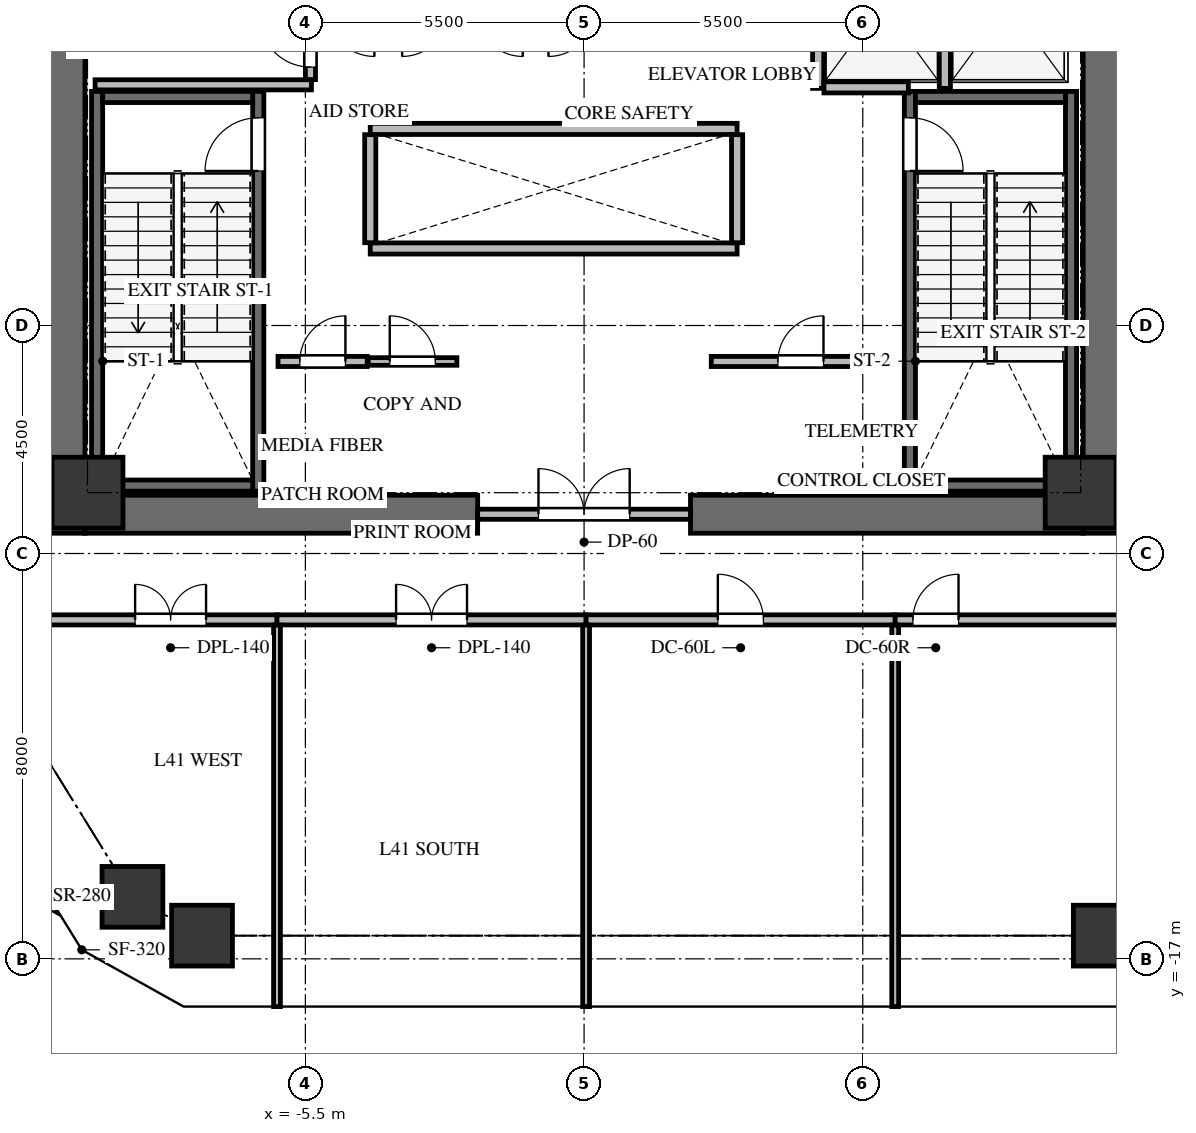
"""IFC4 building model, lengths in metres.
Left out: names, types, materials, properties, quantities, classifications, styles, units other than length and angle.
Written with IfcOpenShell. Run it as: python <this file> out.ifc"""

import sys

from ifc_helpers import new_model, si_unit, direction, frame, frame_2d, origin, origin_2d, place, context, subcontext, project, spatial, rectangle, extrude, source, transform, mapped, element, fill, save


model = new_model("IFC4")
c1 = context("Model", 3, precision=1e-05, world=origin(), true_north=direction((0.0, 1.0)))
c2 = subcontext(c1, "Body", "Model", "MODEL_VIEW")
j1 = project(units=[si_unit("LENGTHUNIT", "METRE"), si_unit("PLANEANGLEUNIT", "RADIAN")], contexts=[c1])
p1 = place(None, origin())
s1 = spatial("IfcSite", under=j1, at=p1, CompositionType="ELEMENT")
p2 = place(p1, origin())
s2 = spatial("IfcBuilding", under=s1, at=p2, CompositionType="ELEMENT")
p3 = place(p2, frame((0.0, 0.0, 150.3)))
s3 = spatial("IfcBuildingStorey", under=s2, at=p3, CompositionType="ELEMENT", Elevation=150.3)
for number, where, z_axis, x_axis in (
    (1, (-10.225, -8.6, 0.0), (0.0, 0.0, 1.0), (0.0, 1.0, 0.0)),
    (2, (10.225, -8.6, 0.0), (0.0, 0.0, 1.0), (0.0, 1.0, 0.0)),
):
    element("IfcWall", number, at=place(p3, frame(where, z_axis=z_axis, x_axis=x_axis)), inside=s3, PredefinedType="SHEAR", context=c2, shape_type="SweptSolid", body=[
        extrude(rectangle(XDim=17.2, YDim=0.75, at=frame_2d((8.6, 0.0))), origin(), (0.0, 0.0, 1.0), 4.8),
    ])
for number, where, z_axis, x_axis in (
    (3, (-9.85, -8.225, 0.0), (0.0, 0.0, 1.0), (1.0, 0.0, 0.0)),
    (4, (2.1, -8.225, 0.0), (0.0, 0.0, 1.0), (1.0, 0.0, 0.0)),
):
    element("IfcWall", number, at=place(p3, frame(where, z_axis=z_axis, x_axis=x_axis)), inside=s3, PredefinedType="SHEAR", context=c2, shape_type="SweptSolid", body=[
        extrude(rectangle(XDim=7.75, YDim=0.75, at=frame_2d((3.875, 0.0))), origin(), (0.0, 0.0, 1.0), 4.8),
    ])
p4 = place(p3, frame((-6.43, -7.77, -0.32), z_axis=(0.0, 0.0, 1.0), x_axis=(0.0, 1.0, 0.0)))
e5 = element("IfcWall", 5, at=p4, inside=s3, PredefinedType="SHEAR", context=c2, shape_type="SweptSolid", body=[
    extrude(rectangle(XDim=7.89, YDim=0.22, at=frame_2d((3.945, 0.0))), origin(), (0.0, 0.0, 1.0), 4.8),
])
p5 = place(p4, frame((6.32, 0.0, 0.0)))
e6 = element("IfcOpeningElement", 6, at=p5, cuts=e5, PredefinedType="OPENING", context=c2, shape_type="SweptSolid", body=[
    extrude(rectangle(XDim=1.05, YDim=2.15, at=frame_2d((0.525, 1.075))), frame((0.0, 0.12, 0.0), z_axis=(0.0, -1.0, 0.0), x_axis=(1.0, 0.0, 0.0)), (0.0, 0.0, 1.0), 0.24),
])
p6 = place(p3, frame((-9.61, 0.12, -0.32), z_axis=(0.0, 0.0, 1.0), x_axis=(0.0, -1.0, 0.0)))
e7 = element("IfcWall", 7, at=p6, inside=s3, PredefinedType="SHEAR", context=c2, shape_type="SweptSolid", body=[
    extrude(rectangle(XDim=7.89, YDim=0.22, at=frame_2d((3.945, 0.0))), origin(), (0.0, 0.0, 1.0), 4.8),
])
for number, where, z_axis, x_axis in (
    (8, (-9.5, -7.66, -0.32), (0.0, 0.0, 1.0), (1.0, 0.0, 0.0)),
    (9, (-6.54, 0.01, -0.32), (0.0, 0.0, 1.0), (-1.0, 0.0, 0.0)),
):
    element("IfcWall", number, at=place(p3, frame(where, z_axis=z_axis, x_axis=x_axis)), inside=s3, PredefinedType="SHEAR", context=c2, shape_type="SweptSolid", body=[
        extrude(rectangle(XDim=2.96, YDim=0.22, at=frame_2d((1.48, 0.0))), origin(), (0.0, 0.0, 1.0), 4.8),
    ])
p7 = place(p3, frame((9.61, -7.77, -0.32), z_axis=(0.0, 0.0, 1.0), x_axis=(0.0, 1.0, 0.0)))
e10 = element("IfcWall", 10, at=p7, inside=s3, PredefinedType="SHEAR", context=c2, shape_type="SweptSolid", body=[
    extrude(rectangle(XDim=7.89, YDim=0.22, at=frame_2d((3.945, 0.0))), origin(), (0.0, 0.0, 1.0), 4.8),
])
p8 = place(p3, frame((6.43, 0.12, -0.32), z_axis=(0.0, 0.0, 1.0), x_axis=(0.0, -1.0, 0.0)))
e11 = element("IfcWall", 11, at=p8, inside=s3, PredefinedType="SHEAR", context=c2, shape_type="SweptSolid", body=[
    extrude(rectangle(XDim=7.89, YDim=0.22, at=frame_2d((3.945, 0.0))), origin(), (0.0, 0.0, 1.0), 4.8),
])
p9 = place(p8, frame((0.52, 0.0, 0.0)))
e12 = element("IfcOpeningElement", 12, at=p9, cuts=e11, PredefinedType="OPENING", context=c2, shape_type="SweptSolid", body=[
    extrude(rectangle(XDim=1.05, YDim=2.15, at=frame_2d((0.525, 1.075))), frame((0.0, 0.12, 0.0), z_axis=(0.0, -1.0, 0.0), x_axis=(1.0, 0.0, 0.0)), (0.0, 0.0, 1.0), 0.24),
])
for number, where, z_axis, x_axis in (
    (13, (6.54, -7.66, -0.32), (0.0, 0.0, 1.0), (1.0, 0.0, 0.0)),
    (14, (9.5, 0.01, -0.32), (0.0, 0.0, 1.0), (-1.0, 0.0, 0.0)),
):
    element("IfcWall", number, at=place(p3, frame(where, z_axis=z_axis, x_axis=x_axis)), inside=s3, PredefinedType="SHEAR", context=c2, shape_type="SweptSolid", body=[
        extrude(rectangle(XDim=2.96, YDim=0.22, at=frame_2d((1.48, 0.0))), origin(), (0.0, 0.0, 1.0), 4.8),
    ])
m1 = source(origin(), c2, "Body", "SweptSolid", [
    extrude(rectangle(XDim=1.4, YDim=1.4, at=origin_2d()), origin(), (0.0, 0.0, 1.0), 4.8),
])
for number, where, z_axis, x_axis in (
    (15, (-9.8, -7.8, -0.32), (0.0, 0.0, 1.0), (1.0, 0.0, 0.0)),
    (16, (9.8, -7.8, -0.32), (0.0, 0.0, 1.0), (1.0, 0.0, 0.0)),
):
    element("IfcColumn", number, at=place(p3, frame(where, z_axis=z_axis, x_axis=x_axis)), inside=s3, PredefinedType="COLUMN", context=c2, shape_type="MappedRepresentation", body=[
        mapped(m1, transform((0.0, 0.0, 0.0), x_axis=(1.0, 0.0, 0.0), y_axis=(0.0, 1.0, 0.0), z_axis=(0.0, 0.0, 1.0), scale=1.0)),
    ])
m2 = source(origin(), c2, "Body", "SweptSolid", [
    extrude(rectangle(XDim=1.2, YDim=1.2, at=origin_2d()), origin(), (0.0, 0.0, 1.0), 4.8),
])
for number, where, z_axis, x_axis in (
    (17, (-8.913, -15.776, -0.32), (0.0, 0.0, 1.0), (1.0, 0.0, 0.0)),
    (18, (10.257, -16.542, -0.32), (0.0, 0.0, 1.0), (1.0, 0.0, 0.0)),
    (19, (-7.54, -16.542, -0.32), (0.0, 0.0, 1.0), (1.0, 0.0, 0.0)),
):
    element("IfcColumn", number, at=place(p3, frame(where, z_axis=z_axis, x_axis=x_axis)), inside=s3, PredefinedType="COLUMN", context=c2, shape_type="MappedRepresentation", body=[
        mapped(m2, transform((0.0, 0.0, 0.0), x_axis=(1.0, 0.0, 0.0), y_axis=(0.0, 1.0, 0.0), z_axis=(0.0, 0.0, 1.0), scale=1.0)),
    ])
p10 = place(p3, frame((-2.1, -8.225, 0.0), z_axis=(0.0, 0.0, 1.0), x_axis=(1.0, 0.0, 0.0)))
e20 = element("IfcWall", 20, at=p10, inside=s3, PredefinedType="SOLIDWALL", context=c2, shape_type="SweptSolid", body=[
    extrude(rectangle(XDim=4.2, YDim=0.2, at=frame_2d((2.1, 0.0))), origin(), (0.0, 0.0, 1.0), 4.465),
])
p11 = place(p10, frame((1.2, 0.0, 0.0)))
e21 = element("IfcOpeningElement", 21, at=p11, cuts=e20, PredefinedType="OPENING", context=c2, shape_type="SweptSolid", body=[
    extrude(rectangle(XDim=1.8, YDim=2.15, at=frame_2d((0.9, 1.075))), frame((0.0, 0.11, 0.0), z_axis=(0.0, -1.0, 0.0), x_axis=(1.0, 0.0, 0.0)), (0.0, 0.0, 1.0), 0.22),
])
p12 = place(p3, frame((-9.65, 0.25, 0.0), z_axis=(0.0, 0.0, 1.0), x_axis=(1.0, 0.0, 0.0)))
e22 = element("IfcWall", 22, at=p12, inside=s3, PredefinedType="SOLIDWALL", context=c2, shape_type="SweptSolid", body=[
    extrude(rectangle(XDim=4.27, YDim=0.2, at=frame_2d((2.135, 0.0))), origin(), (0.0, 0.0, 1.0), 4.465),
])
p13 = place(p3, frame((-5.4, 0.354, 0.0), z_axis=(0.0, 0.0, 1.0), x_axis=(0.0, 1.0, 0.0)))
e23 = element("IfcWall", 23, at=p13, inside=s3, PredefinedType="SOLIDWALL", context=c2, shape_type="SweptSolid", body=[
    extrude(rectangle(XDim=4.026, YDim=0.2, at=frame_2d((2.013, 0.0))), origin(), (0.0, 0.0, 1.0), 4.465),
])
p14 = place(p13, frame((0.246, 0.0, 0.0)))
e24 = element("IfcOpeningElement", 24, at=p14, cuts=e23, PredefinedType="OPENING", context=c2, shape_type="SweptSolid", body=[
    extrude(rectangle(XDim=1.0, YDim=2.15, at=frame_2d((0.5, 1.075))), frame((0.0, 0.11, 0.0), z_axis=(0.0, -1.0, 0.0), x_axis=(1.0, 0.0, 0.0)), (0.0, 0.0, 1.0), 0.22),
])
for number, where, z_axis, x_axis in (
    (25, (4.62, 0.18, 0.0), (0.0, 0.0, 1.0), (0.0, 1.0, 0.0)),
    (26, (7.12, 0.18, 0.0), (0.0, 0.0, 1.0), (0.0, 1.0, 0.0)),
):
    element("IfcWall", number, at=place(p3, frame(where, z_axis=z_axis, x_axis=x_axis)), inside=s3, PredefinedType="SOLIDWALL", context=c2, shape_type="SweptSolid", body=[
        extrude(rectangle(XDim=3.186, YDim=0.22, at=frame_2d((1.593, 0.0))), origin(), (0.0, 0.0, 1.0), 4.465),
    ])
p15 = place(p3, frame((4.734, 0.2, 0.0), z_axis=(0.0, 0.0, 1.0), x_axis=(1.0, 0.0, 0.0)))
e27 = element("IfcWall", 27, at=p15, inside=s3, PredefinedType="SOLIDWALL", context=c2, shape_type="SweptSolid", body=[
    extrude(rectangle(XDim=1.666, YDim=0.22, at=frame_2d((0.833, 0.0))), origin(), (0.0, 0.0, 1.0), 4.465),
])
for number, where, z_axis, x_axis in (
    (28, (-4.22, -2.98, 0.0), (0.0, 0.0, 1.0), (1.0, 0.0, 0.0)),
    (29, (-4.22, -0.62, 0.0), (0.0, 0.0, 1.0), (1.0, 0.0, 0.0)),
):
    element("IfcWall", number, at=place(p3, frame(where, z_axis=z_axis, x_axis=x_axis)), inside=s3, PredefinedType="SOLIDWALL", context=c2, shape_type="SweptSolid", body=[
        extrude(rectangle(XDim=7.24, YDim=0.22, at=frame_2d((3.62, 0.0))), origin(), (0.0, 0.0, 1.0), 4.465),
    ])
for number, where, z_axis, x_axis in (
    (30, (-4.22, -2.866, 0.0), (0.0, 0.0, 1.0), (0.0, 1.0, 0.0)),
    (31, (3.02, -2.866, 0.0), (0.0, 0.0, 1.0), (0.0, 1.0, 0.0)),
):
    element("IfcWall", number, at=place(p3, frame(where, z_axis=z_axis, x_axis=x_axis)), inside=s3, PredefinedType="SOLIDWALL", context=c2, shape_type="SweptSolid", body=[
        extrude(rectangle(XDim=2.132, YDim=0.22, at=frame_2d((1.066, 0.0))), origin(), (0.0, 0.0, 1.0), 4.465),
    ])
p16 = place(p3, frame((-6.04, -5.21, 0.0), z_axis=(0.0, 0.0, 1.0), x_axis=(1.0, 0.0, 0.0)))
e32 = element("IfcWall", 32, at=p16, inside=s3, PredefinedType="SOLIDWALL", context=c2, shape_type="SweptSolid", body=[
    extrude(rectangle(XDim=1.76, YDim=0.2, at=frame_2d((0.88, 0.0))), origin(), (0.0, 0.0, 1.0), 4.465),
])
p17 = place(p16, frame((0.43, 0.0, 0.0)))
e33 = element("IfcOpeningElement", 33, at=p17, cuts=e32, PredefinedType="OPENING", context=c2, shape_type="SweptSolid", body=[
    extrude(rectangle(XDim=0.9, YDim=2.05, at=frame_2d((0.45, 1.025))), frame((0.0, 0.11, 0.0), z_axis=(0.0, -1.0, 0.0), x_axis=(1.0, 0.0, 0.0)), (0.0, 0.0, 1.0), 0.22),
])
p18 = place(p3, frame((-4.26, -5.21, 0.0), z_axis=(0.0, 0.0, 1.0), x_axis=(1.0, 0.0, 0.0)))
e34 = element("IfcWall", 34, at=p18, inside=s3, PredefinedType="PARTITIONING", context=c2, shape_type="SweptSolid", body=[
    extrude(rectangle(XDim=1.75, YDim=0.15, at=frame_2d((0.875, 0.0))), origin(), (0.0, 0.0, 1.0), 4.465),
])
p19 = place(p18, frame((0.425, 0.0, 0.0)))
e35 = element("IfcOpeningElement", 35, at=p19, cuts=e34, PredefinedType="OPENING", context=c2, shape_type="SweptSolid", body=[
    extrude(rectangle(XDim=0.9, YDim=2.05, at=frame_2d((0.45, 1.025))), frame((0.0, 0.085, 0.0), z_axis=(0.0, -1.0, 0.0), x_axis=(1.0, 0.0, 0.0)), (0.0, 0.0, 1.0), 0.17),
])
p20 = place(p3, frame((2.51, -5.21, 0.0), z_axis=(0.0, 0.0, 1.0), x_axis=(1.0, 0.0, 0.0)))
e36 = element("IfcWall", 36, at=p20, inside=s3, PredefinedType="SOLIDWALL", context=c2, shape_type="SweptSolid", body=[
    extrude(rectangle(XDim=3.53, YDim=0.2, at=frame_2d((1.765, 0.0))), origin(), (0.0, 0.0, 1.0), 4.465),
])
p21 = place(p20, frame((1.315, 0.0, 0.0)))
e37 = element("IfcOpeningElement", 37, at=p21, cuts=e36, PredefinedType="OPENING", context=c2, shape_type="SweptSolid", body=[
    extrude(rectangle(XDim=0.9, YDim=2.05, at=frame_2d((0.45, 1.025))), frame((0.0, 0.11, 0.0), z_axis=(0.0, -1.0, 0.0), x_axis=(1.0, 0.0, 0.0)), (0.0, 0.0, 1.0), 0.22),
])
p22 = place(p3, frame((-12.39, -10.31, 0.0), z_axis=(0.0, 0.0, 1.0), x_axis=(1.0, 0.0, 0.0)))
e38 = element("IfcWall", 38, at=p22, inside=s3, PredefinedType="SOLIDWALL", context=c2, shape_type="SweptSolid", body=[
    extrude(rectangle(XDim=6.33, YDim=0.2, at=frame_2d((3.165, 0.0))), origin(), (0.0, 0.0, 1.0), 3.819),
])
p23 = place(p22, frame((3.53, 0.0, 0.0)))
e39 = element("IfcOpeningElement", 39, at=p23, cuts=e38, PredefinedType="OPENING", context=c2, shape_type="SweptSolid", body=[
    extrude(rectangle(XDim=1.4, YDim=2.15, at=frame_2d((0.7, 1.075))), frame((0.0, 0.11, 0.0), z_axis=(0.0, -1.0, 0.0), x_axis=(1.0, 0.0, 0.0)), (0.0, 0.0, 1.0), 0.22),
])
p24 = place(p3, frame((-6.06, -10.31, 0.0), z_axis=(0.0, 0.0, 1.0), x_axis=(1.0, 0.0, 0.0)))
e40 = element("IfcWall", 40, at=p24, inside=s3, PredefinedType="SOLIDWALL", context=c2, shape_type="SweptSolid", body=[
    extrude(rectangle(XDim=6.1, YDim=0.2, at=frame_2d((3.05, 0.0))), origin(), (0.0, 0.0, 1.0), 3.662),
])
p25 = place(p24, frame((2.35, 0.0, 0.0)))
e41 = element("IfcOpeningElement", 41, at=p25, cuts=e40, PredefinedType="OPENING", context=c2, shape_type="SweptSolid", body=[
    extrude(rectangle(XDim=1.4, YDim=2.15, at=frame_2d((0.7, 1.075))), frame((0.0, 0.11, 0.0), z_axis=(0.0, -1.0, 0.0), x_axis=(1.0, 0.0, 0.0)), (0.0, 0.0, 1.0), 0.22),
])
p26 = place(p3, frame((0.04, -10.31, 0.0), z_axis=(0.0, 0.0, 1.0), x_axis=(1.0, 0.0, 0.0)))
e42 = element("IfcWall", 42, at=p26, inside=s3, PredefinedType="SOLIDWALL", context=c2, shape_type="SweptSolid", body=[
    extrude(rectangle(XDim=6.1, YDim=0.2, at=frame_2d((3.05, 0.0))), origin(), (0.0, 0.0, 1.0), 3.662),
])
p27 = place(p26, frame((2.6, 0.0, 0.0)))
e43 = element("IfcOpeningElement", 43, at=p27, cuts=e42, PredefinedType="OPENING", context=c2, shape_type="SweptSolid", body=[
    extrude(rectangle(XDim=0.9, YDim=2.05, at=frame_2d((0.45, 1.025))), frame((0.0, 0.11, 0.0), z_axis=(0.0, -1.0, 0.0), x_axis=(1.0, 0.0, 0.0)), (0.0, 0.0, 1.0), 0.22),
])
p28 = place(p3, frame((6.14, -10.31, 0.0), z_axis=(0.0, 0.0, 1.0), x_axis=(1.0, 0.0, 0.0)))
e44 = element("IfcWall", 44, at=p28, inside=s3, PredefinedType="SOLIDWALL", context=c2, shape_type="SweptSolid", body=[
    extrude(rectangle(XDim=6.25, YDim=0.2, at=frame_2d((3.125, 0.0))), origin(), (0.0, 0.0, 1.0), 4.465),
])
p29 = place(p28, frame((0.35, 0.0, 0.0)))
e45 = element("IfcOpeningElement", 45, at=p29, cuts=e44, PredefinedType="OPENING", context=c2, shape_type="SweptSolid", body=[
    extrude(rectangle(XDim=0.9, YDim=2.05, at=frame_2d((0.45, 1.025))), frame((0.0, 0.11, 0.0), z_axis=(0.0, -1.0, 0.0), x_axis=(1.0, 0.0, 0.0)), (0.0, 0.0, 1.0), 0.22),
])
p30 = place(p3, frame((-6.06, -10.414, 0.0), z_axis=(0.0, 0.0, 1.0), x_axis=(0.0, -1.0, 0.0)))
e46 = element("IfcWall", 46, at=p30, inside=s3, PredefinedType="PARTITIONING", context=c2, shape_type="SweptSolid", body=[
    extrude(rectangle(XDim=7.528, YDim=0.135, at=frame_2d((3.764, 0.0))), origin(), (0.0, 0.0, 1.0), 3.662),
])
p31 = place(p3, frame((0.04, -10.414, 0.0), z_axis=(0.0, 0.0, 1.0), x_axis=(0.0, -1.0, 0.0)))
e47 = element("IfcWall", 47, at=p31, inside=s3, PredefinedType="PARTITIONING", context=c2, shape_type="SweptSolid", body=[
    extrude(rectangle(XDim=7.528, YDim=0.135, at=frame_2d((3.764, 0.0))), origin(), (0.0, 0.0, 1.0), 3.819),
])
p32 = place(p3, frame((6.14, -10.414, 0.0), z_axis=(0.0, 0.0, 1.0), x_axis=(0.0, -1.0, 0.0)))
e48 = element("IfcWall", 48, at=p32, inside=s3, PredefinedType="PARTITIONING", context=c2, shape_type="SweptSolid", body=[
    extrude(rectangle(XDim=7.528, YDim=0.135, at=frame_2d((3.764, 0.0))), origin(), (0.0, 0.0, 1.0), 3.662),
])
m3 = source(origin(), c2, "Body", "SweptSolid", [
    extrude(rectangle(XDim=1.05, YDim=2.15, at=frame_2d((0.525, 1.075))), frame((0.0, 0.025, 0.0), z_axis=(0.0, -1.0, 0.0), x_axis=(1.0, 0.0, 0.0)), (0.0, 0.0, 1.0), 0.05),
])
p33 = place(p5, origin())
e49 = element("IfcDoor", 49, at=p33, inside=s3, OperationType="SINGLE_SWING_LEFT", PredefinedType="DOOR", context=c2, shape_type="MappedRepresentation", body=[
    mapped(m3, transform((0.0, 0.0, 0.0), x_axis=(1.0, 0.0, 0.0), y_axis=(0.0, 1.0, 0.0), z_axis=(0.0, 0.0, 1.0), scale=1.0)),
])
fill(e6, e49)
m4 = source(origin(), c2, "Body", "SweptSolid", [
    extrude(rectangle(XDim=1.05, YDim=2.15, at=frame_2d((0.525, 1.075))), frame((0.0, 0.025, 0.0), z_axis=(0.0, -1.0, 0.0), x_axis=(1.0, 0.0, 0.0)), (0.0, 0.0, 1.0), 0.05),
])
p34 = place(p9, origin())
e50 = element("IfcDoor", 50, at=p34, inside=s3, OperationType="SINGLE_SWING_RIGHT", PredefinedType="DOOR", context=c2, shape_type="MappedRepresentation", body=[
    mapped(m4, transform((0.0, 0.0, 0.0), x_axis=(1.0, 0.0, 0.0), y_axis=(0.0, 1.0, 0.0), z_axis=(0.0, 0.0, 1.0), scale=1.0)),
])
fill(e12, e50)
m5 = source(origin(), c2, "Body", "SweptSolid", [
    extrude(rectangle(XDim=1.8, YDim=2.15, at=frame_2d((0.9, 1.075))), frame((0.0, 0.025, 0.0), z_axis=(0.0, -1.0, 0.0), x_axis=(1.0, 0.0, 0.0)), (0.0, 0.0, 1.0), 0.05),
])
p35 = place(p11, origin())
e51 = element("IfcDoor", 51, at=p35, inside=s3, OperationType="DOUBLE_DOOR_SINGLE_SWING", PredefinedType="DOOR", context=c2, shape_type="MappedRepresentation", body=[
    mapped(m5, transform((0.0, 0.0, 0.0), x_axis=(1.0, 0.0, 0.0), y_axis=(0.0, 1.0, 0.0), z_axis=(0.0, 0.0, 1.0), scale=1.0)),
])
fill(e21, e51)
m6 = source(origin(), c2, "Body", "SweptSolid", [
    extrude(rectangle(XDim=1.0, YDim=2.15, at=frame_2d((0.5, 1.075))), frame((0.0, 0.025, 0.0), z_axis=(0.0, -1.0, 0.0), x_axis=(1.0, 0.0, 0.0)), (0.0, 0.0, 1.0), 0.05),
])
p36 = place(p14, origin())
e52 = element("IfcDoor", 52, at=p36, inside=s3, OperationType="SINGLE_SWING_RIGHT", PredefinedType="DOOR", context=c2, shape_type="MappedRepresentation", body=[
    mapped(m6, transform((0.0, 0.0, 0.0), x_axis=(1.0, 0.0, 0.0), y_axis=(0.0, 1.0, 0.0), z_axis=(0.0, 0.0, 1.0), scale=1.0)),
])
fill(e24, e52)
m7 = source(origin(), c2, "Body", "SweptSolid", [
    extrude(rectangle(XDim=0.9, YDim=2.05, at=frame_2d((0.45, 1.025))), frame((0.0, 0.025, 0.0), z_axis=(0.0, -1.0, 0.0), x_axis=(1.0, 0.0, 0.0)), (0.0, 0.0, 1.0), 0.05),
])
p37 = place(p17, origin())
e53 = element("IfcDoor", 53, at=p37, inside=s3, OperationType="SINGLE_SWING_RIGHT", PredefinedType="DOOR", context=c2, shape_type="MappedRepresentation", body=[
    mapped(m7, transform((0.0, 0.0, 0.0), x_axis=(1.0, 0.0, 0.0), y_axis=(0.0, 1.0, 0.0), z_axis=(0.0, 0.0, 1.0), scale=1.0)),
])
fill(e33, e53)
m8 = source(origin(), c2, "Body", "SweptSolid", [
    extrude(rectangle(XDim=0.9, YDim=2.05, at=frame_2d((0.45, 1.025))), frame((0.0, 0.025, 0.0), z_axis=(0.0, -1.0, 0.0), x_axis=(1.0, 0.0, 0.0)), (0.0, 0.0, 1.0), 0.05),
])
p38 = place(p19, origin())
e54 = element("IfcDoor", 54, at=p38, inside=s3, OperationType="SINGLE_SWING_LEFT", PredefinedType="DOOR", context=c2, shape_type="MappedRepresentation", body=[
    mapped(m8, transform((0.0, 0.0, 0.0), x_axis=(1.0, 0.0, 0.0), y_axis=(0.0, 1.0, 0.0), z_axis=(0.0, 0.0, 1.0), scale=1.0)),
])
fill(e35, e54)
p39 = place(p21, origin())
e55 = element("IfcDoor", 55, at=p39, inside=s3, OperationType="SINGLE_SWING_RIGHT", PredefinedType="DOOR", context=c2, shape_type="MappedRepresentation", body=[
    mapped(m7, transform((0.0, 0.0, 0.0), x_axis=(1.0, 0.0, 0.0), y_axis=(0.0, 1.0, 0.0), z_axis=(0.0, 0.0, 1.0), scale=1.0)),
])
fill(e37, e55)
m9 = source(origin(), c2, "Body", "SweptSolid", [
    extrude(rectangle(XDim=1.4, YDim=2.15, at=frame_2d((0.7, 1.075))), frame((0.0, 0.025, 0.0), z_axis=(0.0, -1.0, 0.0), x_axis=(1.0, 0.0, 0.0)), (0.0, 0.0, 1.0), 0.05),
])
p40 = place(p23, origin())
e56 = element("IfcDoor", 56, at=p40, inside=s3, OperationType="DOUBLE_DOOR_SINGLE_SWING", PredefinedType="DOOR", context=c2, shape_type="MappedRepresentation", body=[
    mapped(m9, transform((0.0, 0.0, 0.0), x_axis=(1.0, 0.0, 0.0), y_axis=(0.0, 1.0, 0.0), z_axis=(0.0, 0.0, 1.0), scale=1.0)),
])
fill(e39, e56)
p41 = place(p25, origin())
e57 = element("IfcDoor", 57, at=p41, inside=s3, OperationType="DOUBLE_DOOR_SINGLE_SWING", PredefinedType="DOOR", context=c2, shape_type="MappedRepresentation", body=[
    mapped(m9, transform((0.0, 0.0, 0.0), x_axis=(1.0, 0.0, 0.0), y_axis=(0.0, 1.0, 0.0), z_axis=(0.0, 0.0, 1.0), scale=1.0)),
])
fill(e41, e57)
p42 = place(p27, origin())
e58 = element("IfcDoor", 58, at=p42, inside=s3, OperationType="SINGLE_SWING_LEFT", PredefinedType="DOOR", context=c2, shape_type="MappedRepresentation", body=[
    mapped(m8, transform((0.0, 0.0, 0.0), x_axis=(1.0, 0.0, 0.0), y_axis=(0.0, 1.0, 0.0), z_axis=(0.0, 0.0, 1.0), scale=1.0)),
])
fill(e43, e58)
p43 = place(p29, origin())
e59 = element("IfcDoor", 59, at=p43, inside=s3, OperationType="SINGLE_SWING_RIGHT", PredefinedType="DOOR", context=c2, shape_type="MappedRepresentation", body=[
    mapped(m7, transform((0.0, 0.0, 0.0), x_axis=(1.0, 0.0, 0.0), y_axis=(0.0, 1.0, 0.0), z_axis=(0.0, 0.0, 1.0), scale=1.0)),
])
fill(e45, e59)
save(model, sys.argv[1])
